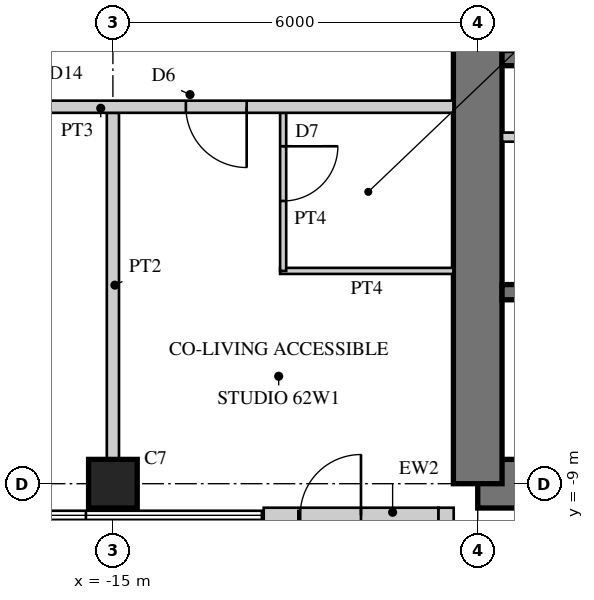
"""IFC4 building model, lengths in metres.
Left out: names, types, materials, properties, quantities, classifications, styles, units other than length and angle.
Written with IfcOpenShell. Run it as: python <this file> out.ifc"""

import sys

from ifc_helpers import new_model, si_unit, direction, frame, frame_2d, origin, origin_2d, place, context, subcontext, project, spatial, rectangle, hollow_rectangle, extrude, element, fill, save


model = new_model("IFC4")
c1 = context("Model", 3, precision=1e-05, world=origin(), true_north=direction((0.0, 1.0)))
c2 = subcontext(c1, "Body", "Model", "MODEL_VIEW")
j1 = project(units=[si_unit("LENGTHUNIT", "METRE"), si_unit("PLANEANGLEUNIT", "RADIAN")], contexts=[c1])
p1 = place(None, origin())
s1 = spatial("IfcSite", under=j1, at=p1, CompositionType="ELEMENT")
p2 = place(p1, origin())
s2 = spatial("IfcBuilding", under=s1, at=p2, CompositionType="ELEMENT")
p3 = place(p2, frame((0.0, 0.0, 242.5)))
s3 = spatial("IfcBuildingStorey", under=s2, at=p3, CompositionType="ELEMENT", Elevation=242.5)
p4 = place(p3, frame((-9.0, -9.0, 0.0), z_axis=(0.0, 0.0, 1.0), x_axis=(1.0, 0.0, 0.0)))
e1 = element("IfcWall", 1, at=p4, inside=s3, PredefinedType="SHEAR", context=c2, shape_type="SweptSolid", body=[
    extrude(rectangle(XDim=18.0, YDim=0.8, at=frame_2d((9.0, 0.0))), origin(), (0.0, 0.0, 1.0), 3.4),
])
p5 = place(p4, frame((9.8, 0.0, 0.0)))
e2 = element("IfcOpeningElement", 2, at=p5, cuts=e1, PredefinedType="OPENING", context=c2, shape_type="SweptSolid", body=[
    extrude(rectangle(XDim=1.0, YDim=2.4, at=frame_2d((0.5, 1.2))), frame((0.0, 0.41, 0.0), z_axis=(0.0, -1.0, 0.0), x_axis=(1.0, 0.0, 0.0)), (0.0, 0.0, 1.0), 0.82),
])
p6 = place(p3, frame((-9.0, 9.0, 0.0), z_axis=(0.0, 0.0, 1.0), x_axis=(0.0, -1.0, 0.0)))
e3 = element("IfcWall", 3, at=p6, inside=s3, PredefinedType="SHEAR", context=c2, shape_type="SweptSolid", body=[
    extrude(rectangle(XDim=18.0, YDim=0.8, at=frame_2d((9.0, 0.0))), origin(), (0.0, 0.0, 1.0), 3.4),
])
p7 = place(p6, frame((9.8, 0.0, 0.0)))
e4 = element("IfcOpeningElement", 4, at=p7, cuts=e3, PredefinedType="OPENING", context=c2, shape_type="SweptSolid", body=[
    extrude(rectangle(XDim=1.0, YDim=2.4, at=frame_2d((0.5, 1.2))), frame((0.0, 0.41, 0.0), z_axis=(0.0, -1.0, 0.0), x_axis=(1.0, 0.0, 0.0)), (0.0, 0.0, 1.0), 0.82),
])
p8 = place(p3, frame((-1.925, -2.0, 0.0), z_axis=(0.0, 0.0, 1.0), x_axis=(-1.0, 0.0, 0.0)))
e5 = element("IfcWall", 5, at=p8, inside=s3, PredefinedType="SHEAR", context=c2, shape_type="SweptSolid", body=[
    extrude(rectangle(XDim=6.675, YDim=0.25, at=frame_2d((3.337, 0.0))), origin(), (0.0, 0.0, 1.0), 3.4),
])
p9 = place(p3, frame((-1.925, -5.85, 0.0), z_axis=(0.0, 0.0, 1.0), x_axis=(-1.0, 0.0, 0.0)))
e6 = element("IfcWall", 6, at=p9, inside=s3, PredefinedType="SHEAR", context=c2, shape_type="SweptSolid", body=[
    extrude(rectangle(XDim=6.675, YDim=0.25, at=frame_2d((3.337, 0.0))), origin(), (0.0, 0.0, 1.0), 3.4),
])
p10 = place(p9, frame((0.496, 0.0, 0.0)))
e7 = element("IfcOpeningElement", 7, at=p10, cuts=e6, PredefinedType="OPENING", context=c2, shape_type="SweptSolid", body=[
    extrude(rectangle(XDim=1.1, YDim=2.2, at=frame_2d((0.55, 1.1))), frame((0.0, 0.135, 0.0), z_axis=(0.0, -1.0, 0.0), x_axis=(1.0, 0.0, 0.0)), (0.0, 0.0, 1.0), 0.27),
])
p11 = place(p9, frame((2.788, 0.0, 0.0)))
e8 = element("IfcOpeningElement", 8, at=p11, cuts=e6, PredefinedType="OPENING", context=c2, shape_type="SweptSolid", body=[
    extrude(rectangle(XDim=1.1, YDim=2.2, at=frame_2d((0.55, 1.1))), frame((0.0, 0.135, 0.0), z_axis=(0.0, -1.0, 0.0), x_axis=(1.0, 0.0, 0.0)), (0.0, 0.0, 1.0), 0.27),
])
p12 = place(p9, frame((5.079, 0.0, 0.0)))
e9 = element("IfcOpeningElement", 9, at=p12, cuts=e6, PredefinedType="OPENING", context=c2, shape_type="SweptSolid", body=[
    extrude(rectangle(XDim=1.1, YDim=2.2, at=frame_2d((0.55, 1.1))), frame((0.0, 0.135, 0.0), z_axis=(0.0, -1.0, 0.0), x_axis=(1.0, 0.0, 0.0)), (0.0, 0.0, 1.0), 0.27),
])
p13 = place(p3, frame((-1.925, -3.3, 0.0), z_axis=(0.0, 0.0, 1.0), x_axis=(-1.0, 0.0, 0.0)))
e10 = element("IfcWall", 10, at=p13, inside=s3, PredefinedType="PARTITIONING", context=c2, shape_type="SweptSolid", body=[
    extrude(rectangle(XDim=6.675, YDim=0.15, at=frame_2d((3.337, 0.0))), origin(), (0.0, 0.0, 1.0), 3.4),
])
p14 = place(p13, frame((0.075, 0.0, 0.0)))
e11 = element("IfcOpeningElement", 11, at=p14, cuts=e10, PredefinedType="OPENING", context=c2, shape_type="SweptSolid", body=[
    extrude(rectangle(XDim=0.8, YDim=2.1, at=frame_2d((0.4, 1.05))), frame((0.0, 0.085, 0.0), z_axis=(0.0, -1.0, 0.0), x_axis=(1.0, 0.0, 0.0)), (0.0, 0.0, 1.0), 0.17),
])
p15 = place(p13, frame((3.675, 0.0, 0.0)))
e12 = element("IfcOpeningElement", 12, at=p15, cuts=e10, PredefinedType="OPENING", context=c2, shape_type="SweptSolid", body=[
    extrude(rectangle(XDim=0.8, YDim=2.1, at=frame_2d((0.4, 1.05))), frame((0.0, 0.085, 0.0), z_axis=(0.0, -1.0, 0.0), x_axis=(1.0, 0.0, 0.0)), (0.0, 0.0, 1.0), 0.17),
])
p16 = place(p3, frame((-15.0, -9.0, 0.0), z_axis=(0.0, 0.0, 1.0), x_axis=(1.0, 0.0, 0.0)))
e13 = element("IfcColumn", 13, at=p16, inside=s3, PredefinedType="COLUMN", context=c2, shape_type="SweptSolid", body=[
    extrude(rectangle(XDim=0.8, YDim=0.8, at=origin_2d()), origin(), (0.0, 0.0, 1.0), 3.4),
])
p17 = place(p3, frame((-12.52, -9.52, 0.0), z_axis=(0.0, 0.0, 1.0), x_axis=(1.0, 0.0, 0.0)))
e14 = element("IfcWall", 14, at=p17, inside=s3, PredefinedType="SOLIDWALL", context=c2, shape_type="SweptSolid", body=[
    extrude(rectangle(XDim=2.875, YDim=0.25, at=frame_2d((1.438, 0.0))), origin(), (0.0, 0.0, 1.0), 3.22),
])
p18 = place(p17, frame((0.6, 0.0, 0.0)))
e15 = element("IfcOpeningElement", 15, at=p18, cuts=e14, PredefinedType="OPENING", context=c2, shape_type="SweptSolid", body=[
    extrude(rectangle(XDim=1.0, YDim=2.2, at=frame_2d((0.5, 1.1))), frame((0.0, 0.135, 0.0), z_axis=(0.0, -1.0, 0.0), x_axis=(1.0, 0.0, 0.0)), (0.0, 0.0, 1.0), 0.27),
])
p19 = place(p3, frame((-9.52, -9.395, 0.0), z_axis=(0.0, 0.0, 1.0), x_axis=(0.0, -1.0, 0.0)))
e16 = element("IfcWall", 16, at=p19, inside=s3, PredefinedType="SOLIDWALL", context=c2, shape_type="SweptSolid", body=[
    extrude(rectangle(XDim=3.125, YDim=0.25, at=frame_2d((1.562, 0.0))), origin(), (0.0, 0.0, 1.0), 3.22),
])
p20 = place(p19, frame((0.6, 0.0, 0.0)))
e17 = element("IfcOpeningElement", 17, at=p20, cuts=e16, PredefinedType="OPENING", context=c2, shape_type="SweptSolid", body=[
    extrude(rectangle(XDim=1.0, YDim=2.2, at=frame_2d((0.5, 1.1))), frame((0.0, 0.135, 0.0), z_axis=(0.0, -1.0, 0.0), x_axis=(1.0, 0.0, 0.0)), (0.0, 0.0, 1.0), 0.27),
])
p21 = place(p3, frame((-9.4, -5.5, 0.0), z_axis=(0.0, 0.0, 1.0), x_axis=(-1.0, 0.0, 0.0)))
e18 = element("IfcWall", 18, at=p21, inside=s3, PredefinedType="PARTITIONING", context=c2, shape_type="SweptSolid", body=[
    extrude(rectangle(XDim=2.85, YDim=0.1, at=frame_2d((1.425, 0.0))), origin(), (0.0, 0.0, 1.0), 3.22),
])
p22 = place(p3, frame((-12.2, -2.9, 0.0), z_axis=(0.0, 0.0, 1.0), x_axis=(0.0, -1.0, 0.0)))
e19 = element("IfcWall", 19, at=p22, inside=s3, PredefinedType="PARTITIONING", context=c2, shape_type="SweptSolid", body=[
    extrude(rectangle(XDim=2.6, YDim=0.1, at=frame_2d((1.3, 0.0))), origin(), (0.0, 0.0, 1.0), 3.22),
])
p23 = place(p22, frame((0.55, 0.0, 0.0)))
e20 = element("IfcOpeningElement", 20, at=p23, cuts=e19, PredefinedType="OPENING", context=c2, shape_type="SweptSolid", body=[
    extrude(rectangle(XDim=0.9, YDim=2.1, at=frame_2d((0.45, 1.05))), frame((0.0, 0.06, 0.0), z_axis=(0.0, -1.0, 0.0), x_axis=(1.0, 0.0, 0.0)), (0.0, 0.0, 1.0), 0.12),
])
p24 = place(p3, frame((-15.0, -2.9, 0.0), z_axis=(0.0, 0.0, 1.0), x_axis=(0.0, -1.0, 0.0)))
e21 = element("IfcWall", 21, at=p24, inside=s3, PredefinedType="SOLIDWALL", context=c2, shape_type="SweptSolid", body=[
    extrude(rectangle(XDim=5.7, YDim=0.2, at=frame_2d((2.85, 0.0))), origin(), (0.0, 0.0, 1.0), 2.52),
])
p25 = place(p3, frame((-9.4, -2.8, 0.0), z_axis=(0.0, 0.0, 1.0), x_axis=(-1.0, 0.0, 0.0)))
e22 = element("IfcWall", 22, at=p25, inside=s3, PredefinedType="SOLIDWALL", context=c2, shape_type="SweptSolid", body=[
    extrude(rectangle(XDim=11.6, YDim=0.2, at=frame_2d((5.8, 0.0))), origin(), (0.0, 0.0, 1.0), 3.22),
])
p26 = place(p25, frame((3.4, 0.0, 0.0)))
e23 = element("IfcOpeningElement", 23, at=p26, cuts=e22, PredefinedType="OPENING", context=c2, shape_type="SweptSolid", body=[
    extrude(rectangle(XDim=1.0, YDim=2.15, at=frame_2d((0.5, 1.075))), frame((0.0, 0.11, 0.0), z_axis=(0.0, -1.0, 0.0), x_axis=(1.0, 0.0, 0.0)), (0.0, 0.0, 1.0), 0.22),
])
p27 = place(p25, frame((6.8, 0.0, 0.0)))
e24 = element("IfcOpeningElement", 24, at=p27, cuts=e22, PredefinedType="OPENING", context=c2, shape_type="SweptSolid", body=[
    extrude(rectangle(XDim=1.0, YDim=2.2, at=frame_2d((0.5, 1.1))), frame((0.0, 0.11, 0.0), z_axis=(0.0, -1.0, 0.0), x_axis=(1.0, 0.0, 0.0)), (0.0, 0.0, 1.0), 0.22),
])
p28 = place(p18, origin())
e25 = element("IfcDoor", 25, at=p28, inside=s3, OperationType="SINGLE_SWING_RIGHT", PredefinedType="DOOR", context=c2, shape_type="SweptSolid", body=[
    extrude(hollow_rectangle(XDim=1.0, YDim=2.2, WallThickness=0.06, at=frame_2d((0.5, 1.1))), frame((0.0, 0.025, 0.0), z_axis=(0.0, -1.0, 0.0), x_axis=(1.0, 0.0, 0.0)), (0.0, 0.0, 1.0), 0.05),
    extrude(rectangle(XDim=0.879, YDim=2.079, at=frame_2d((0.5, 1.1))), frame((0.0, 0.025, 0.0), z_axis=(0.0, -1.0, 0.0), x_axis=(1.0, 0.0, 0.0)), (0.0, 0.0, 1.0), 0.05),
])
fill(e15, e25)
p29 = place(p23, origin())
e26 = element("IfcDoor", 26, at=p29, inside=s3, OperationType="SINGLE_SWING_LEFT", PredefinedType="DOOR", context=c2, shape_type="SweptSolid", body=[
    extrude(rectangle(XDim=0.9, YDim=2.1, at=frame_2d((0.45, 1.05))), frame((0.0, 0.025, 0.0), z_axis=(0.0, -1.0, 0.0), x_axis=(1.0, 0.0, 0.0)), (0.0, 0.0, 1.0), 0.05),
])
fill(e20, e26)
p30 = place(p26, origin())
e27 = element("IfcDoor", 27, at=p30, inside=s3, OperationType="SINGLE_SWING_LEFT", PredefinedType="DOOR", context=c2, shape_type="SweptSolid", body=[
    extrude(rectangle(XDim=1.0, YDim=2.15, at=frame_2d((0.5, 1.075))), frame((0.0, 0.025, 0.0), z_axis=(0.0, -1.0, 0.0), x_axis=(1.0, 0.0, 0.0)), (0.0, 0.0, 1.0), 0.05),
])
fill(e23, e27)
save(model, sys.argv[1])
